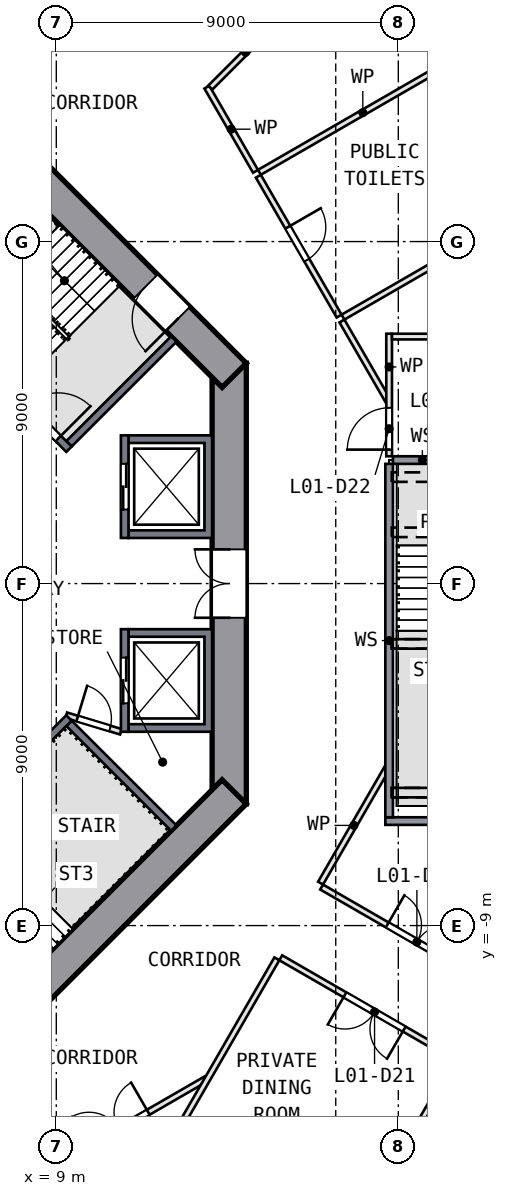
"""IFC4 building model, lengths in metres.
Left out: names, types, materials, properties, quantities, classifications, styles, units other than length and angle.
Written with IfcOpenShell. Run it as: python <this file> out.ifc"""

import sys

from ifc_helpers import new_model, si_unit, direction, frame, frame_2d, origin, place, context, subcontext, project, spatial, polyline, rectangle, outline, extrude, element, fill, save


model = new_model("IFC4")
c1 = context("Model", 3, precision=1e-05, world=origin(), true_north=direction((0.0, 1.0)))
c2 = subcontext(c1, "Body", "Model", "MODEL_VIEW")
j1 = project(units=[si_unit("LENGTHUNIT", "METRE"), si_unit("PLANEANGLEUNIT", "RADIAN")], contexts=[c1])
p1 = place(None, origin())
s1 = spatial("IfcSite", under=j1, at=p1, CompositionType="ELEMENT")
p2 = place(p1, origin())
s2 = spatial("IfcBuilding", under=s1, at=p2, CompositionType="ELEMENT")
p3 = place(p2, frame((0.0, 0.0, 8.0)))
s3 = spatial("IfcBuildingStorey", under=s2, at=p3, CompositionType="ELEMENT", Elevation=8.0)
p4 = place(p3, frame((13.55, -5.799, 0.0), z_axis=(0.0, 0.0, 1.0), x_axis=(0.0, 1.0, 0.0)))
e1 = element("IfcWall", 1, at=p4, inside=s3, PredefinedType="SHEAR", context=c2, shape_type="SweptSolid", body=[
    extrude(rectangle(XDim=11.598, YDim=0.9, at=frame_2d((5.799, 0.0))), origin(), (0.0, 0.0, 1.0), 6.0),
])
p5 = place(p4, frame((4.899, 0.0, 0.0)))
e2 = element("IfcOpeningElement", 2, at=p5, cuts=e1, PredefinedType="OPENING", context=c2, shape_type="SweptSolid", body=[
    extrude(rectangle(XDim=1.8, YDim=2.1, at=frame_2d((0.9, 1.05))), frame((0.0, 0.46, 0.0), z_axis=(0.0, -1.0, 0.0), x_axis=(1.0, 0.0, 0.0)), (0.0, 0.0, 1.0), 0.92),
])
p6 = place(p3, frame((13.682, 5.481, 0.0), z_axis=(0.0, 0.0, 1.0), x_axis=(-0.707106781, 0.707106781, 0.0)))
e3 = element("IfcWall", 3, at=p6, inside=s3, PredefinedType="SHEAR", context=c2, shape_type="SweptSolid", body=[
    extrude(rectangle(XDim=11.598, YDim=0.9, at=frame_2d((5.799, 0.0))), origin(), (0.0, 0.0, 1.0), 6.0),
])
p7 = place(p6, frame((2.099, 0.0, 0.0)))
e4 = element("IfcOpeningElement", 4, at=p7, cuts=e3, PredefinedType="OPENING", context=c2, shape_type="SweptSolid", body=[
    extrude(rectangle(XDim=1.2, YDim=2.1, at=frame_2d((0.6, 1.05))), frame((0.0, 0.46, 0.0), z_axis=(0.0, -1.0, 0.0), x_axis=(1.0, 0.0, 0.0)), (0.0, 0.0, 1.0), 0.92),
])
p8 = place(p3, frame((5.481, -13.682, 0.0), z_axis=(0.0, 0.0, 1.0), x_axis=(0.707106781, 0.707106781, 0.0)))
e5 = element("IfcWall", 5, at=p8, inside=s3, PredefinedType="SHEAR", context=c2, shape_type="SweptSolid", body=[
    extrude(rectangle(XDim=11.598, YDim=0.9, at=frame_2d((5.799, 0.0))), origin(), (0.0, 0.0, 1.0), 6.0),
])
p9 = place(p8, frame((2.099, 0.0, 0.0)))
e6 = element("IfcOpeningElement", 6, at=p9, cuts=e5, PredefinedType="OPENING", context=c2, shape_type="SweptSolid", body=[
    extrude(rectangle(XDim=1.2, YDim=2.1, at=frame_2d((0.6, 1.05))), frame((0.0, 0.46, 0.0), z_axis=(0.0, -1.0, 0.0), x_axis=(1.0, 0.0, 0.0)), (0.0, 0.0, 1.0), 0.92),
])
p10 = place(p3, frame((24.118, 6.603, 0.0), z_axis=(0.0, 0.0, 1.0), x_axis=(-0.499997984, 0.866026568, 0.0)))
e7 = element("IfcWall", 7, at=p10, inside=s3, PredefinedType="SOLIDWALL", context=c2, shape_type="SweptSolid", body=[
    extrude(rectangle(XDim=12.962, YDim=0.14, at=frame_2d((6.481, 0.0))), origin(), (0.0, 0.0, 1.0), 5.55),
])
p11 = place(p3, origin())
e8 = element("IfcWall", 8, at=p11, inside=s3, PredefinedType="SOLIDWALL", context=c2, shape_type="SweptSolid", body=[
    extrude(outline(polyline([(13.1, -3.9), (10.9, -3.9), (10.9, -3.7), (12.9, -3.7), (12.9, -1.4), (10.9, -1.4), (10.9, -1.2), (13.1, -1.2), (13.1, -3.9)])), origin(), (0.0, 0.0, 1.0), 5.55),
])
p12 = place(p3, frame((10.8, -1.2, 0.0), z_axis=(0.0, 0.0, 1.0), x_axis=(0.0, -1.0, 0.0)))
e9 = element("IfcWall", 9, at=p12, inside=s3, PredefinedType="SOLIDWALL", context=c2, shape_type="SweptSolid", body=[
    extrude(rectangle(XDim=2.7, YDim=0.2, at=frame_2d((1.35, 0.0))), origin(), (0.0, 0.0, 1.0), 5.55),
])
p13 = place(p12, frame((0.75, 0.0, 0.0)))
e10 = element("IfcOpeningElement", 10, at=p13, cuts=e9, PredefinedType="OPENING", context=c2, shape_type="SweptSolid", body=[
    extrude(rectangle(XDim=1.2, YDim=2.1, at=frame_2d((0.6, 1.05))), frame((0.0, 0.11, 0.0), z_axis=(0.0, -1.0, 0.0), x_axis=(1.0, 0.0, 0.0)), (0.0, 0.0, 1.0), 0.22),
])
p14 = place(p3, origin())
e11 = element("IfcWall", 11, at=p14, inside=s3, PredefinedType="SOLIDWALL", context=c2, shape_type="SweptSolid", body=[
    extrude(outline(polyline([(13.1, 3.9), (13.1, 1.2), (10.9, 1.2), (10.9, 1.4), (12.9, 1.4), (12.9, 3.7), (10.9, 3.7), (10.9, 3.9), (13.1, 3.9)])), origin(), (0.0, 0.0, 1.0), 5.55),
])
p15 = place(p3, frame((10.8, 1.2, 0.0), z_axis=(0.0, 0.0, 1.0), x_axis=(0.0, 1.0, 0.0)))
e12 = element("IfcWall", 12, at=p15, inside=s3, PredefinedType="SOLIDWALL", context=c2, shape_type="SweptSolid", body=[
    extrude(rectangle(XDim=2.7, YDim=0.2, at=frame_2d((1.35, 0.0))), origin(), (0.0, 0.0, 1.0), 5.55),
])
p16 = place(p15, frame((0.75, 0.0, 0.0)))
e13 = element("IfcOpeningElement", 13, at=p16, cuts=e12, PredefinedType="OPENING", context=c2, shape_type="SweptSolid", body=[
    extrude(rectangle(XDim=1.2, YDim=2.1, at=frame_2d((0.6, 1.05))), frame((0.0, 0.11, 0.0), z_axis=(0.0, -1.0, 0.0), x_axis=(1.0, 0.0, 0.0)), (0.0, 0.0, 1.0), 0.22),
])
p17 = place(p3, frame((3.535, 9.334, 0.0), z_axis=(0.0, 0.0, 1.0), x_axis=(0.707106781, -0.707106781, 0.0)))
e14 = element("IfcWall", 14, at=p17, inside=s3, PredefinedType="SOLIDWALL", context=c2, shape_type="SweptSolid", body=[
    extrude(rectangle(XDim=8.2, YDim=0.2, at=frame_2d((4.1, 0.0))), origin(), (0.0, 0.0, 1.0), 5.55),
])
p18 = place(p17, frame((6.6, 0.0, 0.0)))
e15 = element("IfcOpeningElement", 15, at=p18, cuts=e14, PredefinedType="OPENING", context=c2, shape_type="SweptSolid", body=[
    extrude(rectangle(XDim=1.2, YDim=2.1, at=frame_2d((0.6, 1.05))), frame((0.0, 0.11, 0.0), z_axis=(0.0, -1.0, 0.0), x_axis=(1.0, 0.0, 0.0)), (0.0, 0.0, 1.0), 0.22),
])
p19 = place(p3, frame((9.334, 3.677, 0.0), z_axis=(0.0, 0.0, 1.0), x_axis=(0.707106781, 0.707106781, 0.0)))
e16 = element("IfcWall", 16, at=p19, inside=s3, PredefinedType="SOLIDWALL", context=c2, shape_type="SweptSolid", body=[
    extrude(rectangle(XDim=3.9, YDim=0.2, at=frame_2d((1.95, 0.0))), origin(), (0.0, 0.0, 1.0), 5.55),
])
p20 = place(p3, frame((9.334, -3.535, 0.0), z_axis=(0.0, 0.0, 1.0), x_axis=(-0.707106781, -0.707106781, 0.0)))
e17 = element("IfcWall", 17, at=p20, inside=s3, PredefinedType="SOLIDWALL", context=c2, shape_type="SweptSolid", body=[
    extrude(rectangle(XDim=8.2, YDim=0.2, at=frame_2d((4.1, 0.0))), origin(), (0.0, 0.0, 1.0), 5.55),
])
p21 = place(p20, frame((6.6, 0.0, 0.0)))
e18 = element("IfcOpeningElement", 18, at=p21, cuts=e17, PredefinedType="OPENING", context=c2, shape_type="SweptSolid", body=[
    extrude(rectangle(XDim=1.2, YDim=2.1, at=frame_2d((0.6, 1.05))), frame((0.0, 0.11, 0.0), z_axis=(0.0, -1.0, 0.0), x_axis=(1.0, 0.0, 0.0)), (0.0, 0.0, 1.0), 0.22),
])
p22 = place(p3, frame((9.334, -3.677, 0.0), z_axis=(0.0, 0.0, 1.0), x_axis=(0.707106781, -0.707106781, 0.0)))
e19 = element("IfcWall", 19, at=p22, inside=s3, PredefinedType="SOLIDWALL", context=c2, shape_type="SweptSolid", body=[
    extrude(rectangle(XDim=3.9, YDim=0.2, at=frame_2d((1.95, 0.0))), origin(), (0.0, 0.0, 1.0), 5.55),
])
p23 = place(p3, frame((9.263, -3.465, 0.0), z_axis=(0.0, 0.0, 1.0), x_axis=(0.957084567, -0.289808785, 0.0)))
e20 = element("IfcWall", 20, at=p23, inside=s3, PredefinedType="PARTITIONING", context=c2, shape_type="SweptSolid", body=[
    extrude(rectangle(XDim=1.501, YDim=0.15, at=frame_2d((0.75, 0.0))), origin(), (0.0, 0.0, 1.0), 5.55),
])
p24 = place(p23, frame((0.301, 0.0, 0.0)))
e21 = element("IfcOpeningElement", 21, at=p24, cuts=e20, PredefinedType="OPENING", context=c2, shape_type="SweptSolid", body=[
    extrude(rectangle(XDim=0.9, YDim=2.1, at=frame_2d((0.45, 1.05))), frame((0.0, 0.085, 0.0), z_axis=(0.0, -1.0, 0.0), x_axis=(1.0, 0.0, 0.0)), (0.0, 0.0, 1.0), 0.17),
])
p25 = place(p3, frame((4.823, -17.721, 0.0), z_axis=(0.0, 0.0, 1.0), x_axis=(0.866037142, 0.499979668, 0.0)))
e22 = element("IfcWall", 22, at=p25, inside=s3, PredefinedType="PARTITIONING", context=c2, shape_type="SweptSolid", body=[
    extrude(rectangle(XDim=9.367, YDim=0.15, at=frame_2d((4.683, 0.0))), origin(), (0.0, 0.0, 1.0), 5.55),
])
p26 = place(p25, frame((5.817, 0.0, 0.0)))
e23 = element("IfcOpeningElement", 23, at=p26, cuts=e22, PredefinedType="OPENING", context=c2, shape_type="SweptSolid", body=[
    extrude(rectangle(XDim=1.8, YDim=2.1, at=frame_2d((0.9, 1.05))), frame((0.0, 0.085, 0.0), z_axis=(0.0, -1.0, 0.0), x_axis=(1.0, 0.0, 0.0)), (0.0, 0.0, 1.0), 0.17),
])
p27 = place(p3, frame((12.962, 13.065, 0.0), z_axis=(0.0, 0.0, 1.0), x_axis=(0.499997778, -0.866026686, 0.0)))
e24 = element("IfcWall", 24, at=p27, inside=s3, PredefinedType="PARTITIONING", context=c2, shape_type="SweptSolid", body=[
    extrude(rectangle(XDim=2.559, YDim=0.15, at=frame_2d((1.279, 0.0))), origin(), (0.0, 0.0, 1.0), 5.55),
])
p28 = place(p3, frame((14.317, 10.719, 0.0), z_axis=(0.0, 0.0, 1.0), x_axis=(0.500037366, -0.866003829, 0.0)))
e25 = element("IfcWall", 25, at=p28, inside=s3, PredefinedType="PARTITIONING", context=c2, shape_type="SweptSolid", body=[
    extrude(rectangle(XDim=4.25, YDim=0.15, at=frame_2d((2.125, 0.0))), origin(), (0.0, 0.0, 1.0), 5.55),
])
p29 = place(p28, frame((1.55, 0.0, 0.0)))
e26 = element("IfcOpeningElement", 26, at=p29, cuts=e25, PredefinedType="OPENING", context=c2, shape_type="SweptSolid", body=[
    extrude(rectangle(XDim=1.0, YDim=2.1, at=frame_2d((0.5, 1.05))), frame((0.0, 0.085, 0.0), z_axis=(0.0, -1.0, 0.0), x_axis=(1.0, 0.0, 0.0)), (0.0, 0.0, 1.0), 0.17),
])
p30 = place(p3, frame((14.804, -9.875, 0.0), z_axis=(0.0, 0.0, 1.0), x_axis=(-0.4999885, -0.866032043, 0.0)))
e27 = element("IfcWall", 27, at=p30, inside=s3, PredefinedType="PARTITIONING", context=c2, shape_type="SweptSolid", body=[
    extrude(rectangle(XDim=5.375, YDim=0.15, at=frame_2d((2.688, 0.0))), origin(), (0.0, 0.0, 1.0), 5.55),
])
p31 = place(p3, frame((20.055, -12.82, 0.0), z_axis=(0.0, 0.0, 1.0), x_axis=(-0.866038559, 0.499977214, 0.0)))
e28 = element("IfcWall", 28, at=p31, inside=s3, PredefinedType="PARTITIONING", context=c2, shape_type="SweptSolid", body=[
    extrude(rectangle(XDim=5.945, YDim=0.15, at=frame_2d((2.973, 0.0))), origin(), (0.0, 0.0, 1.0), 5.55),
])
p32 = place(p31, frame((2.195, 0.0, 0.0)))
e29 = element("IfcOpeningElement", 29, at=p32, cuts=e28, PredefinedType="OPENING", context=c2, shape_type="SweptSolid", body=[
    extrude(rectangle(XDim=1.8, YDim=2.1, at=frame_2d((0.9, 1.05))), frame((0.0, 0.085, 0.0), z_axis=(0.0, -1.0, 0.0), x_axis=(1.0, 0.0, 0.0)), (0.0, 0.0, 1.0), 0.17),
])
p33 = place(p3, frame((16.517, 6.909, 0.0), z_axis=(0.0, 0.0, 1.0), x_axis=(0.499933044, -0.866064057, 0.0)))
e30 = element("IfcWall", 30, at=p33, inside=s3, PredefinedType="PARTITIONING", context=c2, shape_type="SweptSolid", body=[
    extrude(rectangle(XDim=2.408, YDim=0.15, at=frame_2d((1.204, 0.0))), origin(), (0.0, 0.0, 1.0), 5.55),
])
p34 = place(p3, frame((17.189, -16.585, 0.0), z_axis=(0.0, 0.0, 1.0), x_axis=(0.50002748, 0.866009538, 0.0)))
e31 = element("IfcWall", 31, at=p34, inside=s3, PredefinedType="PARTITIONING", context=c2, shape_type="SweptSolid", body=[
    extrude(rectangle(XDim=4.619, YDim=0.15, at=frame_2d((2.31, 0.0))), origin(), (0.0, 0.0, 1.0), 5.55),
])
p35 = place(p3, frame((17.658, -6.25, 0.0), z_axis=(0.0, 0.0, 1.0), x_axis=(1.0, 0.0, 0.0)))
e32 = element("IfcWall", 32, at=p35, inside=s3, PredefinedType="SOLIDWALL", context=c2, shape_type="SweptSolid", body=[
    extrude(rectangle(XDim=4.8, YDim=0.2, at=frame_2d((2.4, 0.0))), origin(), (0.0, 0.0, 1.0), 5.55),
])
p36 = place(p3, frame((17.708, -4.845, 0.0), z_axis=(0.0, 0.0, 1.0), x_axis=(-0.499993523, -0.866029143, 0.0)))
e33 = element("IfcWall", 33, at=p36, inside=s3, PredefinedType="PARTITIONING", context=c2, shape_type="SweptSolid", body=[
    extrude(rectangle(XDim=3.508, YDim=0.15, at=frame_2d((1.754, 0.0))), origin(), (0.0, 0.0, 1.0), 5.55),
])
p37 = place(p3, frame((17.758, 3.15, 0.0), z_axis=(0.0, 0.0, 1.0), x_axis=(0.0, -1.0, 0.0)))
e34 = element("IfcWall", 34, at=p37, inside=s3, PredefinedType="SOLIDWALL", context=c2, shape_type="SweptSolid", body=[
    extrude(rectangle(XDim=9.3, YDim=0.2, at=frame_2d((4.65, 0.0))), origin(), (0.0, 0.0, 1.0), 5.55),
])
p38 = place(p3, frame((17.758, 3.35, 0.0), z_axis=(0.0, 0.0, 1.0), x_axis=(0.0, 1.0, 0.0)))
e35 = element("IfcWall", 35, at=p38, inside=s3, PredefinedType="PARTITIONING", context=c2, shape_type="SweptSolid", body=[
    extrude(rectangle(XDim=3.225, YDim=0.15, at=frame_2d((1.613, 0.0))), origin(), (0.0, 0.0, 1.0), 5.55),
])
p39 = place(p38, frame((0.175, 0.0, 0.0)))
e36 = element("IfcOpeningElement", 36, at=p39, cuts=e35, PredefinedType="OPENING", context=c2, shape_type="SweptSolid", body=[
    extrude(rectangle(XDim=1.1, YDim=2.1, at=frame_2d((0.55, 1.05))), frame((0.0, 0.085, 0.0), z_axis=(0.0, -1.0, 0.0), x_axis=(1.0, 0.0, 0.0)), (0.0, 0.0, 1.0), 0.17),
])
p40 = place(p3, frame((17.7, 17.7, 0.0), z_axis=(0.0, 0.0, 1.0), x_axis=(-0.707106781, -0.707106781, 0.0)))
e37 = element("IfcWall", 37, at=p40, inside=s3, PredefinedType="PARTITIONING", context=c2, shape_type="SweptSolid", body=[
    extrude(rectangle(XDim=6.572, YDim=0.15, at=frame_2d((3.286, 0.0))), origin(), (0.0, 0.0, 1.0), 5.55),
])
p41 = place(p40, frame((2.75, 0.0, 0.0)))
e38 = element("IfcOpeningElement", 38, at=p41, cuts=e37, PredefinedType="OPENING", context=c2, shape_type="SweptSolid", body=[
    extrude(rectangle(XDim=1.0, YDim=2.1, at=frame_2d((0.5, 1.05))), frame((0.0, 0.085, 0.0), z_axis=(0.0, -1.0, 0.0), x_axis=(1.0, 0.0, 0.0)), (0.0, 0.0, 1.0), 0.17),
])
p42 = place(p3, frame((19.787, 13.964, 0.0), z_axis=(0.0, 0.0, 1.0), x_axis=(-0.866042631, -0.49997016, 0.0)))
e39 = element("IfcWall", 39, at=p42, inside=s3, PredefinedType="PARTITIONING", context=c2, shape_type="SweptSolid", body=[
    extrude(rectangle(XDim=6.285, YDim=0.15, at=frame_2d((3.143, 0.0))), origin(), (0.0, 0.0, 1.0), 5.55),
])
p43 = place(p3, frame((21.987, 10.154, 0.0), z_axis=(0.0, 0.0, 1.0), x_axis=(-0.866032921, -0.49998698, 0.0)))
e40 = element("IfcWall", 40, at=p43, inside=s3, PredefinedType="PARTITIONING", context=c2, shape_type="SweptSolid", body=[
    extrude(rectangle(XDim=6.285, YDim=0.15, at=frame_2d((3.143, 0.0))), origin(), (0.0, 0.0, 1.0), 5.55),
])
p44 = place(p3, frame((17.858, 3.25, 0.0), z_axis=(0.0, 0.0, 1.0), x_axis=(1.0, 0.0, 0.0)))
e41 = element("IfcWall", 41, at=p44, inside=s3, PredefinedType="SOLIDWALL", context=c2, shape_type="SweptSolid", body=[
    extrude(rectangle(XDim=4.6, YDim=0.2, at=frame_2d((2.3, 0.0))), origin(), (0.0, 0.0, 1.0), 5.55),
])
p45 = place(p44, frame((1.75, 0.0, 0.0)))
e42 = element("IfcOpeningElement", 42, at=p45, cuts=e41, PredefinedType="OPENING", context=c2, shape_type="SweptSolid", body=[
    extrude(rectangle(XDim=1.1, YDim=2.1, at=frame_2d((0.55, 1.05))), frame((0.0, 0.11, 0.0), z_axis=(0.0, -1.0, 0.0), x_axis=(1.0, 0.0, 0.0)), (0.0, 0.0, 1.0), 0.22),
])
p46 = place(p3, frame((24.118, 6.5, 0.0), z_axis=(0.0, 0.0, 1.0), x_axis=(-1.0, 0.0, 0.0)))
e43 = element("IfcWall", 43, at=p46, inside=s3, PredefinedType="PARTITIONING", context=c2, shape_type="SweptSolid", body=[
    extrude(rectangle(XDim=6.285, YDim=0.15, at=frame_2d((3.143, 0.0))), origin(), (0.0, 0.0, 1.0), 5.55),
])
p47 = place(p46, frame((2.55, 0.0, 0.0)))
e44 = element("IfcOpeningElement", 44, at=p47, cuts=e43, PredefinedType="OPENING", context=c2, shape_type="SweptSolid", body=[
    extrude(rectangle(XDim=1.0, YDim=2.1, at=frame_2d((0.5, 1.05))), frame((0.0, 0.085, 0.0), z_axis=(0.0, -1.0, 0.0), x_axis=(1.0, 0.0, 0.0)), (0.0, 0.0, 1.0), 0.17),
])
p48 = place(p46, frame((3.95, 0.0, 0.0)))
e45 = element("IfcOpeningElement", 45, at=p48, cuts=e43, PredefinedType="OPENING", context=c2, shape_type="SweptSolid", body=[
    extrude(rectangle(XDim=1.0, YDim=2.1, at=frame_2d((0.5, 1.05))), frame((0.0, 0.085, 0.0), z_axis=(0.0, -1.0, 0.0), x_axis=(1.0, 0.0, 0.0)), (0.0, 0.0, 1.0), 0.17),
])
p49 = place(p3, frame((15.982, -7.986, 0.0), z_axis=(0.0, 0.0, 1.0), x_axis=(0.86601051, -0.500025795, 0.0)))
e46 = element("IfcWall", 46, at=p49, inside=s3, PredefinedType="PARTITIONING", context=c2, shape_type="SweptSolid", body=[
    extrude(rectangle(XDim=5.945, YDim=0.15, at=frame_2d((2.973, 0.0))), origin(), (0.0, 0.0, 1.0), 5.55),
])
p50 = place(p49, frame((1.995, 0.0, 0.0)))
e47 = element("IfcOpeningElement", 47, at=p50, cuts=e46, PredefinedType="OPENING", context=c2, shape_type="SweptSolid", body=[
    extrude(rectangle(XDim=1.8, YDim=2.1, at=frame_2d((0.9, 1.05))), frame((0.0, 0.085, 0.0), z_axis=(0.0, -1.0, 0.0), x_axis=(1.0, 0.0, 0.0)), (0.0, 0.0, 1.0), 0.17),
])
p51 = place(p13, origin())
e48 = element("IfcDoor", 48, at=p51, inside=s3, OperationType="DOUBLE_DOOR_SLIDING", PredefinedType="DOOR", context=c2, shape_type="SweptSolid", body=[
    extrude(rectangle(XDim=1.2, YDim=2.1, at=frame_2d((0.6, 1.05))), frame((0.0, 0.025, 0.0), z_axis=(0.0, -1.0, 0.0), x_axis=(1.0, 0.0, 0.0)), (0.0, 0.0, 1.0), 0.05),
])
fill(e10, e48)
p52 = place(p16, origin())
e49 = element("IfcDoor", 49, at=p52, inside=s3, OperationType="DOUBLE_DOOR_SLIDING", PredefinedType="DOOR", context=c2, shape_type="SweptSolid", body=[
    extrude(rectangle(XDim=1.2, YDim=2.1, at=frame_2d((0.6, 1.05))), frame((0.0, 0.025, 0.0), z_axis=(0.0, -1.0, 0.0), x_axis=(1.0, 0.0, 0.0)), (0.0, 0.0, 1.0), 0.05),
])
fill(e13, e49)
p53 = place(p18, origin())
e50 = element("IfcDoor", 50, at=p53, inside=s3, OperationType="SINGLE_SWING_RIGHT", PredefinedType="DOOR", context=c2, shape_type="SweptSolid", body=[
    extrude(rectangle(XDim=1.2, YDim=2.1, at=frame_2d((0.6, 1.05))), frame((0.0, 0.025, 0.0), z_axis=(0.0, -1.0, 0.0), x_axis=(1.0, 0.0, 0.0)), (0.0, 0.0, 1.0), 0.05),
])
fill(e15, e50)
p54 = place(p5, origin())
e51 = element("IfcDoor", 51, at=p54, inside=s3, OperationType="DOUBLE_DOOR_SINGLE_SWING", PredefinedType="DOOR", context=c2, shape_type="SweptSolid", body=[
    extrude(rectangle(XDim=1.8, YDim=2.1, at=frame_2d((0.9, 1.05))), frame((0.0, 0.025, 0.0), z_axis=(0.0, -1.0, 0.0), x_axis=(1.0, 0.0, 0.0)), (0.0, 0.0, 1.0), 0.05),
])
fill(e2, e51)
p55 = place(p7, origin())
e52 = element("IfcDoor", 52, at=p55, inside=s3, OperationType="SINGLE_SWING_LEFT", PredefinedType="DOOR", context=c2, shape_type="SweptSolid", body=[
    extrude(rectangle(XDim=1.2, YDim=2.1, at=frame_2d((0.6, 1.05))), frame((0.0, 0.025, 0.0), z_axis=(0.0, -1.0, 0.0), x_axis=(1.0, 0.0, 0.0)), (0.0, 0.0, 1.0), 0.05),
])
fill(e4, e52)
p56 = place(p24, origin())
e53 = element("IfcDoor", 53, at=p56, inside=s3, OperationType="SINGLE_SWING_LEFT", PredefinedType="DOOR", context=c2, shape_type="SweptSolid", body=[
    extrude(rectangle(XDim=0.9, YDim=2.1, at=frame_2d((0.45, 1.05))), frame((0.0, 0.025, 0.0), z_axis=(0.0, -1.0, 0.0), x_axis=(1.0, 0.0, 0.0)), (0.0, 0.0, 1.0), 0.05),
])
fill(e21, e53)
p57 = place(p26, origin())
e54 = element("IfcDoor", 54, at=p57, inside=s3, OperationType="DOUBLE_DOOR_SINGLE_SWING", PredefinedType="DOOR", context=c2, shape_type="SweptSolid", body=[
    extrude(rectangle(XDim=1.8, YDim=2.1, at=frame_2d((0.9, 1.05))), frame((0.0, 0.025, 0.0), z_axis=(0.0, -1.0, 0.0), x_axis=(1.0, 0.0, 0.0)), (0.0, 0.0, 1.0), 0.05),
])
fill(e23, e54)
p58 = place(p29, origin())
e55 = element("IfcDoor", 55, at=p58, inside=s3, OperationType="SINGLE_SWING_LEFT", PredefinedType="DOOR", context=c2, shape_type="SweptSolid", body=[
    extrude(rectangle(XDim=1.0, YDim=2.1, at=frame_2d((0.5, 1.05))), frame((0.0, 0.025, 0.0), z_axis=(0.0, -1.0, 0.0), x_axis=(1.0, 0.0, 0.0)), (0.0, 0.0, 1.0), 0.05),
])
fill(e26, e55)
p59 = place(p32, origin())
e56 = element("IfcDoor", 56, at=p59, inside=s3, OperationType="DOUBLE_DOOR_SINGLE_SWING", PredefinedType="DOOR", context=c2, shape_type="SweptSolid", body=[
    extrude(rectangle(XDim=1.8, YDim=2.1, at=frame_2d((0.9, 1.05))), frame((0.0, 0.025, 0.0), z_axis=(0.0, -1.0, 0.0), x_axis=(1.0, 0.0, 0.0)), (0.0, 0.0, 1.0), 0.05),
])
fill(e29, e56)
p60 = place(p39, origin())
e57 = element("IfcDoor", 57, at=p60, inside=s3, OperationType="SINGLE_SWING_LEFT", PredefinedType="DOOR", context=c2, shape_type="SweptSolid", body=[
    extrude(rectangle(XDim=1.1, YDim=2.1, at=frame_2d((0.55, 1.05))), frame((0.0, 0.025, 0.0), z_axis=(0.0, -1.0, 0.0), x_axis=(1.0, 0.0, 0.0)), (0.0, 0.0, 1.0), 0.05),
])
fill(e36, e57)
p61 = place(p50, origin())
e58 = element("IfcDoor", 58, at=p61, inside=s3, OperationType="DOUBLE_DOOR_SINGLE_SWING", PredefinedType="DOOR", context=c2, shape_type="SweptSolid", body=[
    extrude(rectangle(XDim=1.8, YDim=2.1, at=frame_2d((0.9, 1.05))), frame((0.0, 0.025, 0.0), z_axis=(0.0, -1.0, 0.0), x_axis=(1.0, 0.0, 0.0)), (0.0, 0.0, 1.0), 0.05),
])
fill(e47, e58)
save(model, sys.argv[1])
